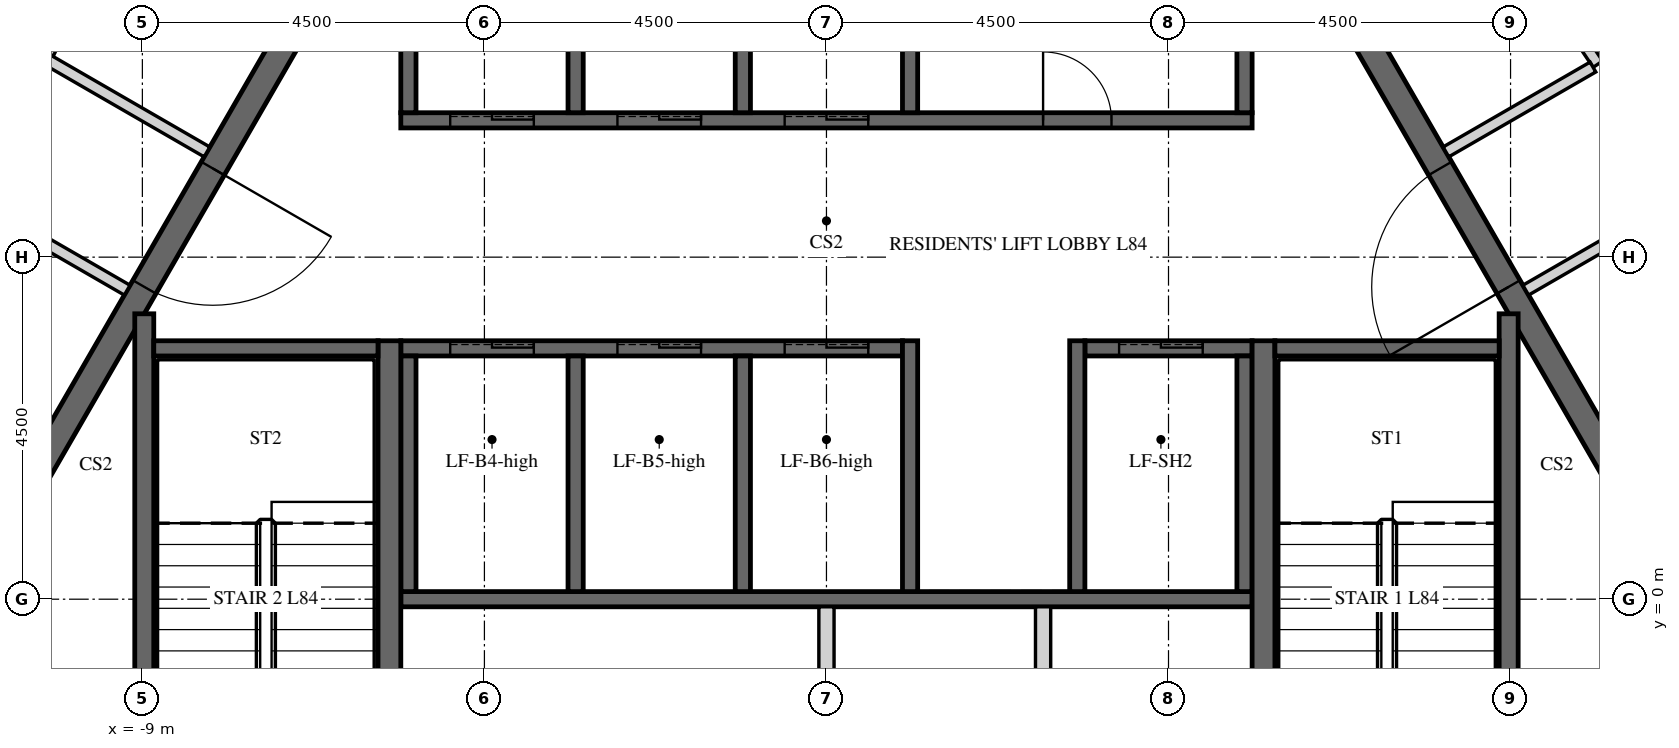
"""IFC4 building model, lengths in metres.
Left out: names, types, materials, properties, quantities, classifications, styles, units other than length and angle.
Written with IfcOpenShell. Run it as: python <this file> out.ifc"""

import sys

from ifc_helpers import new_model, si_unit, direction, frame, frame_2d, origin, place, context, subcontext, project, spatial, polyline, rectangle, outline, extrude, element, fill, save


model = new_model("IFC4")
c1 = context("Model", 3, precision=1e-05, world=origin(), true_north=direction((0.0, 1.0)))
c2 = subcontext(c1, "Body", "Model", "MODEL_VIEW")
j1 = project(units=[si_unit("LENGTHUNIT", "METRE"), si_unit("PLANEANGLEUNIT", "RADIAN")], contexts=[c1])
p1 = place(None, origin())
s1 = spatial("IfcSite", under=j1, at=p1, CompositionType="ELEMENT")
p2 = place(p1, origin())
s2 = spatial("IfcBuilding", under=s1, at=p2, CompositionType="ELEMENT")
p3 = place(p2, frame((0.0, 0.0, 349.5)))
s3 = spatial("IfcBuildingStorey", under=s2, at=p3, CompositionType="ELEMENT", Elevation=349.5)
p4 = place(p3, frame((-5.673, 9.825, 0.0), z_axis=(0.0, 0.0, 1.0), x_axis=(-0.499995046907, -0.866028263435, 0.0)))
e1 = element("IfcWall", 1, at=p4, inside=s3, PredefinedType="SHEAR", context=c2, shape_type="SweptSolid", body=[
    extrude(outline(polyline([(-0.101, -0.175), (11.446, -0.175), (11.244, 0.175), (0.101, 0.175), (-0.101, -0.175)])), origin(), (0.0, 0.0, 1.0), 3.75),
])
p5 = place(p4, frame((4.801, 0.0, 0.0)))
e2 = element("IfcOpeningElement", 2, at=p5, cuts=e1, PredefinedType="OPENING", context=c2, shape_type="SweptSolid", body=[
    extrude(rectangle(XDim=1.8, YDim=2.4, at=frame_2d((0.9, 1.2))), frame((0.0, 0.185, 0.0), z_axis=(0.0, -1.0, 0.0), x_axis=(1.0, 0.0, 0.0)), (0.0, 0.0, 1.0), 0.37),
])
p6 = place(p3, frame((-11.345, 0.0, 0.0), z_axis=(0.0, 0.0, 1.0), x_axis=(0.499995046907, -0.866028263435, 0.0)))
e3 = element("IfcWall", 3, at=p6, inside=s3, PredefinedType="SHEAR", context=c2, shape_type="SweptSolid", body=[
    extrude(outline(polyline([(-0.101, -0.175), (11.446, -0.175), (11.244, 0.175), (0.101, 0.175), (-0.101, -0.175)])), origin(), (0.0, 0.0, 1.0), 3.75),
])
p7 = place(p6, frame((4.744, 0.0, 0.0)))
e4 = element("IfcOpeningElement", 4, at=p7, cuts=e3, PredefinedType="OPENING", context=c2, shape_type="SweptSolid", body=[
    extrude(rectangle(XDim=1.8, YDim=2.4, at=frame_2d((0.9, 1.2))), frame((0.0, 0.185, 0.0), z_axis=(0.0, -1.0, 0.0), x_axis=(1.0, 0.0, 0.0)), (0.0, 0.0, 1.0), 0.37),
])
p8 = place(p3, frame((5.673, -9.825, 0.0), z_axis=(0.0, 0.0, 1.0), x_axis=(0.499995046907, 0.866028263435, 0.0)))
e5 = element("IfcWall", 5, at=p8, inside=s3, PredefinedType="SHEAR", context=c2, shape_type="SweptSolid", body=[
    extrude(outline(polyline([(-0.101, -0.175), (11.446, -0.175), (11.244, 0.175), (0.101, 0.175), (-0.101, -0.175)])), origin(), (0.0, 0.0, 1.0), 3.75),
])
p9 = place(p8, frame((4.801, 0.0, 0.0)))
e6 = element("IfcOpeningElement", 6, at=p9, cuts=e5, PredefinedType="OPENING", context=c2, shape_type="SweptSolid", body=[
    extrude(rectangle(XDim=1.8, YDim=2.4, at=frame_2d((0.9, 1.2))), frame((0.0, 0.185, 0.0), z_axis=(0.0, -1.0, 0.0), x_axis=(1.0, 0.0, 0.0)), (0.0, 0.0, 1.0), 0.37),
])
p10 = place(p3, frame((11.345, 0.0, 0.0), z_axis=(0.0, 0.0, 1.0), x_axis=(-0.499995046907, 0.866028263435, 0.0)))
e7 = element("IfcWall", 7, at=p10, inside=s3, PredefinedType="SHEAR", context=c2, shape_type="SweptSolid", body=[
    extrude(outline(polyline([(-0.101, -0.175), (11.446, -0.175), (11.244, 0.175), (0.101, 0.175), (-0.101, -0.175)])), origin(), (0.0, 0.0, 1.0), 3.75),
])
p11 = place(p10, frame((4.744, 0.0, 0.0)))
e8 = element("IfcOpeningElement", 8, at=p11, cuts=e7, PredefinedType="OPENING", context=c2, shape_type="SweptSolid", body=[
    extrude(rectangle(XDim=1.8, YDim=2.4, at=frame_2d((0.9, 1.2))), frame((0.0, 0.185, 0.0), z_axis=(0.0, -1.0, 0.0), x_axis=(1.0, 0.0, 0.0)), (0.0, 0.0, 1.0), 0.37),
])
p12 = place(p3, frame((-5.6, 6.3, -0.5), z_axis=(0.0, 0.0, 1.0), x_axis=(1.0, 0.0, 0.0)))
e9 = element("IfcWall", 9, at=p12, inside=s3, PredefinedType="SHEAR", context=c2, shape_type="SweptSolid", body=[
    extrude(rectangle(XDim=11.2, YDim=0.2, at=frame_2d((5.6, 0.0))), origin(), (0.0, 0.0, 1.0), 4.15),
])
p13 = place(p12, frame((8.45, 0.0, 0.5)))
e10 = element("IfcOpeningElement", 10, at=p13, cuts=e9, PredefinedType="OPENING", context=c2, shape_type="SweptSolid", body=[
    extrude(rectangle(XDim=0.9, YDim=2.1, at=frame_2d((0.45, 1.05))), frame((0.0, 0.11, 0.0), z_axis=(0.0, -1.0, 0.0), x_axis=(1.0, 0.0, 0.0)), (0.0, 0.0, 1.0), 0.22),
])
p14 = place(p12, frame((0.65, 0.0, 0.5)))
e11 = element("IfcOpeningElement", 11, at=p14, cuts=e9, PredefinedType="OPENING", context=c2, shape_type="SweptSolid", body=[
    extrude(rectangle(XDim=1.1, YDim=2.1, at=frame_2d((0.55, 1.05))), frame((0.0, 0.11, 0.0), z_axis=(0.0, -1.0, 0.0), x_axis=(1.0, 0.0, 0.0)), (0.0, 0.0, 1.0), 0.22),
])
p15 = place(p12, frame((2.85, 0.0, 0.5)))
e12 = element("IfcOpeningElement", 12, at=p15, cuts=e9, PredefinedType="OPENING", context=c2, shape_type="SweptSolid", body=[
    extrude(rectangle(XDim=1.1, YDim=2.1, at=frame_2d((0.55, 1.05))), frame((0.0, 0.11, 0.0), z_axis=(0.0, -1.0, 0.0), x_axis=(1.0, 0.0, 0.0)), (0.0, 0.0, 1.0), 0.22),
])
p16 = place(p12, frame((5.05, 0.0, 0.5)))
e13 = element("IfcOpeningElement", 13, at=p16, cuts=e9, PredefinedType="OPENING", context=c2, shape_type="SweptSolid", body=[
    extrude(rectangle(XDim=1.1, YDim=2.1, at=frame_2d((0.55, 1.05))), frame((0.0, 0.11, 0.0), z_axis=(0.0, -1.0, 0.0), x_axis=(1.0, 0.0, 0.0)), (0.0, 0.0, 1.0), 0.22),
])
for number, where, z_axis, x_axis in (
    (14, (-5.5, 6.4, -0.5), (0.0, 0.0, 1.0), (0.0, 1.0, 0.0)),
    (15, (-3.3, 6.4, -0.5), (0.0, 0.0, 1.0), (0.0, 1.0, 0.0)),
    (16, (-1.1, 6.4, -0.5), (0.0, 0.0, 1.0), (0.0, 1.0, 0.0)),
    (17, (1.1, 6.4, -0.5), (0.0, 0.0, 1.0), (0.0, 1.0, 0.0)),
    (18, (5.5, 6.4, -0.5), (0.0, 0.0, 1.0), (0.0, 1.0, 0.0)),
):
    element("IfcWall", number, at=place(p3, frame(where, z_axis=z_axis, x_axis=x_axis)), inside=s3, PredefinedType="SHEAR", context=c2, shape_type="SweptSolid", body=[
        extrude(rectangle(XDim=2.9, YDim=0.2, at=frame_2d((1.45, 0.0))), origin(), (0.0, 0.0, 1.0), 4.15),
    ])
p17 = place(p3, frame((-5.6, 3.3, -0.5), z_axis=(0.0, 0.0, 1.0), x_axis=(1.0, 0.0, 0.0)))
e19 = element("IfcWall", 19, at=p17, inside=s3, PredefinedType="SHEAR", context=c2, shape_type="SweptSolid", body=[
    extrude(rectangle(XDim=6.6, YDim=0.2, at=frame_2d((3.3, 0.0))), origin(), (0.0, 0.0, 1.0), 4.15),
])
p18 = place(p17, frame((0.65, 0.0, 0.5)))
e20 = element("IfcOpeningElement", 20, at=p18, cuts=e19, PredefinedType="OPENING", context=c2, shape_type="SweptSolid", body=[
    extrude(rectangle(XDim=1.1, YDim=2.1, at=frame_2d((0.55, 1.05))), frame((0.0, 0.11, 0.0), z_axis=(0.0, -1.0, 0.0), x_axis=(1.0, 0.0, 0.0)), (0.0, 0.0, 1.0), 0.22),
])
p19 = place(p17, frame((2.85, 0.0, 0.5)))
e21 = element("IfcOpeningElement", 21, at=p19, cuts=e19, PredefinedType="OPENING", context=c2, shape_type="SweptSolid", body=[
    extrude(rectangle(XDim=1.1, YDim=2.1, at=frame_2d((0.55, 1.05))), frame((0.0, 0.11, 0.0), z_axis=(0.0, -1.0, 0.0), x_axis=(1.0, 0.0, 0.0)), (0.0, 0.0, 1.0), 0.22),
])
p20 = place(p17, frame((5.05, 0.0, 0.5)))
e22 = element("IfcOpeningElement", 22, at=p20, cuts=e19, PredefinedType="OPENING", context=c2, shape_type="SweptSolid", body=[
    extrude(rectangle(XDim=1.1, YDim=2.1, at=frame_2d((0.55, 1.05))), frame((0.0, 0.11, 0.0), z_axis=(0.0, -1.0, 0.0), x_axis=(1.0, 0.0, 0.0)), (0.0, 0.0, 1.0), 0.22),
])
p21 = place(p3, frame((3.4, 3.3, -0.5), z_axis=(0.0, 0.0, 1.0), x_axis=(1.0, 0.0, 0.0)))
e23 = element("IfcWall", 23, at=p21, inside=s3, PredefinedType="SHEAR", context=c2, shape_type="SweptSolid", body=[
    extrude(rectangle(XDim=2.2, YDim=0.2, at=frame_2d((1.1, 0.0))), origin(), (0.0, 0.0, 1.0), 4.15),
])
p22 = place(p21, frame((0.45, 0.0, 0.5)))
e24 = element("IfcOpeningElement", 24, at=p22, cuts=e23, PredefinedType="OPENING", context=c2, shape_type="SweptSolid", body=[
    extrude(rectangle(XDim=1.1, YDim=2.1, at=frame_2d((0.55, 1.05))), frame((0.0, 0.11, 0.0), z_axis=(0.0, -1.0, 0.0), x_axis=(1.0, 0.0, 0.0)), (0.0, 0.0, 1.0), 0.22),
])
p23 = place(p3, frame((-5.6, 0.0, -0.5), z_axis=(0.0, 0.0, 1.0), x_axis=(1.0, 0.0, 0.0)))
e25 = element("IfcWall", 25, at=p23, inside=s3, PredefinedType="SHEAR", context=c2, shape_type="SweptSolid", body=[
    extrude(rectangle(XDim=11.2, YDim=0.2, at=frame_2d((5.6, 0.0))), origin(), (0.0, 0.0, 1.0), 4.15),
])
for number, where, z_axis, x_axis in (
    (26, (-5.5, 0.1, -0.5), (0.0, 0.0, 1.0), (0.0, 1.0, 0.0)),
    (27, (-3.3, 0.1, -0.5), (0.0, 0.0, 1.0), (0.0, 1.0, 0.0)),
    (28, (-1.1, 0.1, -0.5), (0.0, 0.0, 1.0), (0.0, 1.0, 0.0)),
):
    element("IfcWall", number, at=place(p3, frame(where, z_axis=z_axis, x_axis=x_axis)), inside=s3, PredefinedType="SHEAR", context=c2, shape_type="SweptSolid", body=[
        extrude(rectangle(XDim=3.1, YDim=0.2, at=frame_2d((1.55, 0.0))), origin(), (0.0, 0.0, 1.0), 4.15),
    ])
for number, where, z_axis, x_axis in (
    (29, (1.1, 0.1, -0.5), (0.0, 0.0, 1.0), (0.0, 1.0, 0.0)),
    (30, (3.3, 0.1, -0.5), (0.0, 0.0, 1.0), (0.0, 1.0, 0.0)),
):
    element("IfcWall", number, at=place(p3, frame(where, z_axis=z_axis, x_axis=x_axis)), inside=s3, PredefinedType="SHEAR", context=c2, shape_type="SweptSolid", body=[
        extrude(rectangle(XDim=3.3, YDim=0.2, at=frame_2d((1.65, 0.0))), origin(), (0.0, 0.0, 1.0), 4.15),
    ])
p24 = place(p3, frame((5.5, 0.1, -0.5), z_axis=(0.0, 0.0, 1.0), x_axis=(0.0, 1.0, 0.0)))
e31 = element("IfcWall", 31, at=p24, inside=s3, PredefinedType="SHEAR", context=c2, shape_type="SweptSolid", body=[
    extrude(rectangle(XDim=3.1, YDim=0.2, at=frame_2d((1.55, 0.0))), origin(), (0.0, 0.0, 1.0), 4.15),
])
p25 = place(p3, frame((2.85, -3.2, 0.0), z_axis=(0.0, 0.0, 1.0), x_axis=(0.0, 1.0, 0.0)))
e32 = element("IfcWall", 32, at=p25, inside=s3, PredefinedType="PARTITIONING", context=c2, shape_type="SweptSolid", body=[
    extrude(rectangle(XDim=3.1, YDim=0.2, at=frame_2d((1.55, 0.0))), origin(), (0.0, 0.0, 1.0), 3.65),
])
p26 = place(p3, frame((0.0, -6.2, 0.0), z_axis=(0.0, 0.0, 1.0), x_axis=(0.0, 1.0, 0.0)))
e33 = element("IfcWall", 33, at=p26, inside=s3, PredefinedType="PARTITIONING", context=c2, shape_type="SweptSolid", body=[
    extrude(rectangle(XDim=6.1, YDim=0.2, at=frame_2d((3.05, 0.0))), origin(), (0.0, 0.0, 1.0), 3.65),
])
p27 = place(p3, frame((5.75, -3.4, -0.5), z_axis=(0.0, 0.0, 1.0), x_axis=(0.0, 1.0, 0.0)))
e34 = element("IfcWall", 34, at=p27, inside=s3, PredefinedType="SHEAR", context=c2, shape_type="SweptSolid", body=[
    extrude(rectangle(XDim=6.8, YDim=0.3, at=frame_2d((3.4, 0.0))), origin(), (0.0, 0.0, 1.0), 4.15),
])
p28 = place(p3, frame((8.975, -3.755, -0.5), z_axis=(0.0, 0.0, 1.0), x_axis=(0.0, 1.0, 0.0)))
e35 = element("IfcWall", 35, at=p28, inside=s3, PredefinedType="SHEAR", context=c2, shape_type="SweptSolid", body=[
    extrude(rectangle(XDim=7.51, YDim=0.25, at=frame_2d((3.755, 0.0))), origin(), (0.0, 0.0, 1.0), 4.15),
])
p29 = place(p3, frame((5.9, 3.3, -0.5), z_axis=(0.0, 0.0, 1.0), x_axis=(1.0, 0.0, 0.0)))
e36 = element("IfcWall", 36, at=p29, inside=s3, PredefinedType="SHEAR", context=c2, shape_type="SweptSolid", body=[
    extrude(rectangle(XDim=2.95, YDim=0.2, at=frame_2d((1.475, 0.0))), origin(), (0.0, 0.0, 1.0), 4.15),
])
p30 = place(p3, frame((-5.75, -3.4, -0.5), z_axis=(0.0, 0.0, 1.0), x_axis=(0.0, 1.0, 0.0)))
e37 = element("IfcWall", 37, at=p30, inside=s3, PredefinedType="SHEAR", context=c2, shape_type="SweptSolid", body=[
    extrude(rectangle(XDim=6.8, YDim=0.3, at=frame_2d((3.4, 0.0))), origin(), (0.0, 0.0, 1.0), 4.15),
])
p31 = place(p3, frame((-8.975, -3.755, -0.5), z_axis=(0.0, 0.0, 1.0), x_axis=(0.0, 1.0, 0.0)))
e38 = element("IfcWall", 38, at=p31, inside=s3, PredefinedType="SHEAR", context=c2, shape_type="SweptSolid", body=[
    extrude(rectangle(XDim=7.51, YDim=0.25, at=frame_2d((3.755, 0.0))), origin(), (0.0, 0.0, 1.0), 4.15),
])
p32 = place(p3, frame((-8.85, 3.3, -0.5), z_axis=(0.0, 0.0, 1.0), x_axis=(1.0, 0.0, 0.0)))
e39 = element("IfcWall", 39, at=p32, inside=s3, PredefinedType="SHEAR", context=c2, shape_type="SweptSolid", body=[
    extrude(rectangle(XDim=2.95, YDim=0.2, at=frame_2d((1.475, 0.0))), origin(), (0.0, 0.0, 1.0), 4.15),
])
p33 = place(p3, frame((-7.903, 16.075, 0.0), z_axis=(0.0, 0.0, 1.0), x_axis=(-0.438364761272, -0.898797160696, 0.0)))
e40 = element("IfcWall", 40, at=p33, inside=s3, PredefinedType="PARTITIONING", context=c2, shape_type="SweptSolid", body=[
    extrude(rectangle(XDim=15.688, YDim=0.15, at=frame_2d((7.844, 0.0))), origin(), (0.0, 0.0, 1.0), 2.82),
])
p34 = place(p33, frame((2.942, 0.0, 0.0)))
e41 = element("IfcOpeningElement", 41, at=p34, cuts=e40, PredefinedType="OPENING", context=c2, shape_type="SweptSolid", body=[
    extrude(rectangle(XDim=1.0, YDim=2.1, at=frame_2d((0.5, 1.05))), frame((0.0, 0.085, 0.0), z_axis=(0.0, -1.0, 0.0), x_axis=(1.0, 0.0, 0.0)), (0.0, 0.0, 1.0), 0.17),
])
p35 = place(p3, frame((-11.131, 5.18, 0.0), z_axis=(0.0, 0.0, 1.0), x_axis=(0.866037886895, -0.499978377995, 0.0)))
e42 = element("IfcWall", 42, at=p35, inside=s3, PredefinedType="PARTITIONING", context=c2, shape_type="SweptSolid", body=[
    extrude(rectangle(XDim=2.229, YDim=0.15, at=frame_2d((1.115, 0.0))), origin(), (0.0, 0.0, 1.0), 2.82),
])
p36 = place(p3, frame((-8.15, 5.884, 0.0), z_axis=(0.0, 0.0, 1.0), x_axis=(-0.866009790468, 0.500027042082, 0.0)))
e43 = element("IfcWall", 43, at=p36, inside=s3, PredefinedType="PARTITIONING", context=c2, shape_type="SweptSolid", body=[
    extrude(rectangle(XDim=2.451, YDim=0.15, at=frame_2d((1.226, 0.0))), origin(), (0.0, 0.0, 1.0), 2.82),
])
p37 = place(p3, frame((-10.24, 7.178, 0.0), z_axis=(0.0, 0.0, 1.0), x_axis=(0.438356120288, 0.898801375058, 0.0)))
e44 = element("IfcWall", 44, at=p37, inside=s3, PredefinedType="PARTITIONING", context=c2, shape_type="SweptSolid", body=[
    extrude(rectangle(XDim=7.98, YDim=0.15, at=frame_2d((3.99, 0.0))), origin(), (0.0, 0.0, 1.0), 2.82),
])
p38 = place(p3, frame((17.873, -1.193, 0.0), z_axis=(0.0, 0.0, 1.0), x_axis=(-0.559195650252, 0.829035719821, 0.0)))
e45 = element("IfcWall", 45, at=p38, inside=s3, PredefinedType="PARTITIONING", context=c2, shape_type="SweptSolid", body=[
    extrude(rectangle(XDim=15.688, YDim=0.15, at=frame_2d((7.844, 0.0))), origin(), (0.0, 0.0, 1.0), 2.82),
])
p39 = place(p38, frame((5.792, 0.0, 0.0)))
e46 = element("IfcOpeningElement", 46, at=p39, cuts=e45, PredefinedType="OPENING", context=c2, shape_type="SweptSolid", body=[
    extrude(rectangle(XDim=1.0, YDim=2.1, at=frame_2d((0.5, 1.05))), frame((0.0, 0.085, 0.0), z_axis=(0.0, -1.0, 0.0), x_axis=(1.0, 0.0, 0.0)), (0.0, 0.0, 1.0), 0.17),
])
p40 = place(p3, frame((9.2, 4.066, 0.0), z_axis=(0.0, 0.0, 1.0), x_axis=(0.866038240688, 0.499977765172, 0.0)))
e47 = element("IfcWall", 47, at=p40, inside=s3, PredefinedType="PARTITIONING", context=c2, shape_type="SweptSolid", body=[
    extrude(rectangle(XDim=2.456, YDim=0.15, at=frame_2d((1.228, 0.0))), origin(), (0.0, 0.0, 1.0), 2.82),
])
p41 = place(p3, frame((7.221, 11.38, 0.0), z_axis=(0.0, 0.0, 1.0), x_axis=(0.559200548931, -0.829032415576, 0.0)))
e48 = element("IfcWall", 48, at=p41, inside=s3, PredefinedType="PARTITIONING", context=c2, shape_type="SweptSolid", body=[
    extrude(rectangle(XDim=5.236, YDim=0.15, at=frame_2d((2.618, 0.0))), origin(), (0.0, 0.0, 1.0), 2.82),
])
p42 = place(p41, frame((2.168, 0.0, 0.0)))
e49 = element("IfcOpeningElement", 49, at=p42, cuts=e48, PredefinedType="OPENING", context=c2, shape_type="SweptSolid", body=[
    extrude(rectangle(XDim=0.9, YDim=2.1, at=frame_2d((0.45, 1.05))), frame((0.0, 0.085, 0.0), z_axis=(0.0, -1.0, 0.0), x_axis=(1.0, 0.0, 0.0)), (0.0, 0.0, 1.0), 0.17),
])
p43 = place(p3, frame((10.084, 7.001, 0.0), z_axis=(0.0, 0.0, 1.0), x_axis=(-0.865994457699, -0.500053596362, 0.0)))
e50 = element("IfcWall", 50, at=p43, inside=s3, PredefinedType="PARTITIONING", context=c2, shape_type="SweptSolid", body=[
    extrude(rectangle(XDim=2.234, YDim=0.15, at=frame_2d((1.117, 0.0))), origin(), (0.0, 0.0, 1.0), 2.82),
])
p44 = place(p5, origin())
e51 = element("IfcDoor", 51, at=p44, inside=s3, OperationType="DOUBLE_DOOR_SINGLE_SWING", PredefinedType="DOOR", context=c2, shape_type="SweptSolid", body=[
    extrude(rectangle(XDim=1.8, YDim=2.4, at=frame_2d((0.9, 1.2))), frame((0.0, 0.025, 0.0), z_axis=(0.0, -1.0, 0.0), x_axis=(1.0, 0.0, 0.0)), (0.0, 0.0, 1.0), 0.05),
])
fill(e2, e51)
p45 = place(p11, origin())
e52 = element("IfcDoor", 52, at=p45, inside=s3, OperationType="DOUBLE_DOOR_SINGLE_SWING", PredefinedType="DOOR", context=c2, shape_type="SweptSolid", body=[
    extrude(rectangle(XDim=1.8, YDim=2.4, at=frame_2d((0.9, 1.2))), frame((0.0, 0.025, 0.0), z_axis=(0.0, -1.0, 0.0), x_axis=(1.0, 0.0, 0.0)), (0.0, 0.0, 1.0), 0.05),
])
fill(e8, e52)
p46 = place(p13, origin())
e53 = element("IfcDoor", 53, at=p46, inside=s3, OperationType="SINGLE_SWING_LEFT", PredefinedType="DOOR", context=c2, shape_type="SweptSolid", body=[
    extrude(rectangle(XDim=0.9, YDim=2.1, at=frame_2d((0.45, 1.05))), frame((0.0, 0.025, 0.0), z_axis=(0.0, -1.0, 0.0), x_axis=(1.0, 0.0, 0.0)), (0.0, 0.0, 1.0), 0.05),
])
fill(e10, e53)
p47 = place(p14, origin())
e54 = element("IfcDoor", 54, at=p47, inside=s3, OperationType="SLIDING_TO_LEFT", PredefinedType="DOOR", context=c2, shape_type="SweptSolid", body=[
    extrude(rectangle(XDim=1.1, YDim=2.1, at=frame_2d((0.55, 1.05))), frame((0.0, 0.025, 0.0), z_axis=(0.0, -1.0, 0.0), x_axis=(1.0, 0.0, 0.0)), (0.0, 0.0, 1.0), 0.05),
])
fill(e11, e54)
p48 = place(p15, origin())
e55 = element("IfcDoor", 55, at=p48, inside=s3, OperationType="SLIDING_TO_LEFT", PredefinedType="DOOR", context=c2, shape_type="SweptSolid", body=[
    extrude(rectangle(XDim=1.1, YDim=2.1, at=frame_2d((0.55, 1.05))), frame((0.0, 0.025, 0.0), z_axis=(0.0, -1.0, 0.0), x_axis=(1.0, 0.0, 0.0)), (0.0, 0.0, 1.0), 0.05),
])
fill(e12, e55)
p49 = place(p16, origin())
e56 = element("IfcDoor", 56, at=p49, inside=s3, OperationType="SLIDING_TO_LEFT", PredefinedType="DOOR", context=c2, shape_type="SweptSolid", body=[
    extrude(rectangle(XDim=1.1, YDim=2.1, at=frame_2d((0.55, 1.05))), frame((0.0, 0.025, 0.0), z_axis=(0.0, -1.0, 0.0), x_axis=(1.0, 0.0, 0.0)), (0.0, 0.0, 1.0), 0.05),
])
fill(e13, e56)
p50 = place(p18, origin())
e57 = element("IfcDoor", 57, at=p50, inside=s3, OperationType="SLIDING_TO_LEFT", PredefinedType="DOOR", context=c2, shape_type="SweptSolid", body=[
    extrude(rectangle(XDim=1.1, YDim=2.1, at=frame_2d((0.55, 1.05))), frame((0.0, 0.025, 0.0), z_axis=(0.0, -1.0, 0.0), x_axis=(1.0, 0.0, 0.0)), (0.0, 0.0, 1.0), 0.05),
])
fill(e20, e57)
p51 = place(p19, origin())
e58 = element("IfcDoor", 58, at=p51, inside=s3, OperationType="SLIDING_TO_LEFT", PredefinedType="DOOR", context=c2, shape_type="SweptSolid", body=[
    extrude(rectangle(XDim=1.1, YDim=2.1, at=frame_2d((0.55, 1.05))), frame((0.0, 0.025, 0.0), z_axis=(0.0, -1.0, 0.0), x_axis=(1.0, 0.0, 0.0)), (0.0, 0.0, 1.0), 0.05),
])
fill(e21, e58)
p52 = place(p20, origin())
e59 = element("IfcDoor", 59, at=p52, inside=s3, OperationType="SLIDING_TO_LEFT", PredefinedType="DOOR", context=c2, shape_type="SweptSolid", body=[
    extrude(rectangle(XDim=1.1, YDim=2.1, at=frame_2d((0.55, 1.05))), frame((0.0, 0.025, 0.0), z_axis=(0.0, -1.0, 0.0), x_axis=(1.0, 0.0, 0.0)), (0.0, 0.0, 1.0), 0.05),
])
fill(e22, e59)
p53 = place(p22, origin())
e60 = element("IfcDoor", 60, at=p53, inside=s3, OperationType="SLIDING_TO_LEFT", PredefinedType="DOOR", context=c2, shape_type="SweptSolid", body=[
    extrude(rectangle(XDim=1.1, YDim=2.1, at=frame_2d((0.55, 1.05))), frame((0.0, 0.025, 0.0), z_axis=(0.0, -1.0, 0.0), x_axis=(1.0, 0.0, 0.0)), (0.0, 0.0, 1.0), 0.05),
])
fill(e24, e60)
save(model, sys.argv[1])
